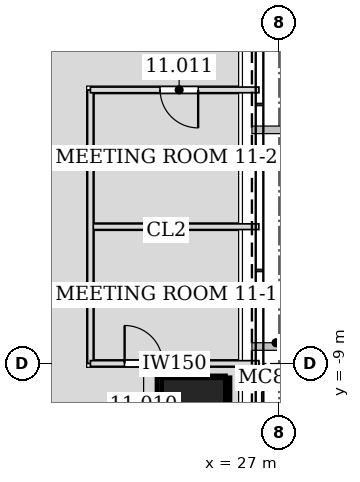
"""IFC4 building model, lengths in metres.
Left out: names, types, materials, properties, quantities, classifications, styles, units other than length and angle.
Written with IfcOpenShell. Run it as: python <this file> out.ifc"""

import sys

from ifc_helpers import new_model, si_unit, direction, frame, frame_2d, origin, origin_2d, place, context, subcontext, project, spatial, rectangle, hollow_rectangle, extrude, element, fill, save


model = new_model("IFC4")
c1 = context("Model", 3, precision=1e-05, world=origin(), true_north=direction((0.0, 1.0)))
c2 = subcontext(c1, "Body", "Model", "MODEL_VIEW")
j1 = project(units=[si_unit("LENGTHUNIT", "METRE"), si_unit("PLANEANGLEUNIT", "RADIAN")], contexts=[c1])
p1 = place(None, origin())
s1 = spatial("IfcSite", under=j1, at=p1, CompositionType="ELEMENT")
p2 = place(p1, origin())
s2 = spatial("IfcBuilding", under=s1, at=p2, CompositionType="ELEMENT")
p3 = place(p2, frame((0.0, 0.0, 54.0)))
s3 = spatial("IfcBuildingStorey", under=s2, at=p3, CompositionType="ELEMENT", Elevation=54.0)
p4 = place(p3, frame((24.809, -10.276, 0.0), z_axis=(-0.028237693676, 0.011678552323, 0.999533012997), x_axis=(-0.382183844423, -0.924086310396, 0.0)))
e1 = element("IfcColumn", 1, at=p4, inside=s3, PredefinedType="COLUMN", context=c2, shape_type="SweptSolid", body=[
    extrude(hollow_rectangle(XDim=1.8, YDim=1.8, WallThickness=0.085, at=origin_2d()), origin(), (0.0, 0.0, 1.0), 4.202),
])
p5 = place(p3, frame((26.469, -5.4, 0.0), z_axis=(0.0, 0.0, 1.0), x_axis=(-1.0, 0.0, 0.0)))
e2 = element("IfcWall", 2, at=p5, inside=s3, PredefinedType="PARTITIONING", context=c2, shape_type="SweptSolid", body=[
    extrude(rectangle(XDim=4.432, YDim=0.15, at=frame_2d((2.216, 0.0))), origin(), (0.0, 0.0, 1.0), 3.418),
])
p6 = place(p3, frame((22.037, -9.0, 0.0), z_axis=(0.0, 0.0, 1.0), x_axis=(0.0, 1.0, 0.0)))
e3 = element("IfcWall", 3, at=p6, inside=s3, PredefinedType="PARTITIONING", context=c2, shape_type="SweptSolid", body=[
    extrude(rectangle(XDim=7.2, YDim=0.15, at=frame_2d((3.6, 0.0))), origin(), (0.0, 0.0, 1.0), 4.035),
])
p7 = place(p3, frame((22.037, -9.0, 0.0), z_axis=(0.0, 0.0, 1.0), x_axis=(1.0, 0.0, 0.0)))
e4 = element("IfcWall", 4, at=p7, inside=s3, PredefinedType="PARTITIONING", context=c2, shape_type="SweptSolid", body=[
    extrude(rectangle(XDim=4.434, YDim=0.15, at=frame_2d((2.217, 0.0))), origin(), (0.0, 0.0, 1.0), 3.418),
])
p8 = place(p7, frame((0.9, 0.0, 0.0)))
e5 = element("IfcOpeningElement", 5, at=p8, cuts=e4, PredefinedType="OPENING", context=c2, shape_type="SweptSolid", body=[
    extrude(rectangle(XDim=1.0, YDim=2.1, at=frame_2d((0.5, 1.05))), frame((0.0, 0.085, 0.0), z_axis=(0.0, -1.0, 0.0), x_axis=(1.0, 0.0, 0.0)), (0.0, 0.0, 1.0), 0.17),
])
p9 = place(p3, frame((26.471, -1.8, 0.0), z_axis=(0.0, 0.0, 1.0), x_axis=(-1.0, 0.0, 0.0)))
e6 = element("IfcWall", 6, at=p9, inside=s3, PredefinedType="PARTITIONING", context=c2, shape_type="SweptSolid", body=[
    extrude(rectangle(XDim=4.434, YDim=0.15, at=frame_2d((2.217, 0.0))), origin(), (0.0, 0.0, 1.0), 3.418),
])
p10 = place(p9, frame((1.599, 0.0, 0.0)))
e7 = element("IfcOpeningElement", 7, at=p10, cuts=e6, PredefinedType="OPENING", context=c2, shape_type="SweptSolid", body=[
    extrude(rectangle(XDim=1.0, YDim=2.1, at=frame_2d((0.5, 1.05))), frame((0.0, 0.085, 0.0), z_axis=(0.0, -1.0, 0.0), x_axis=(1.0, 0.0, 0.0)), (0.0, 0.0, 1.0), 0.17),
])
p11 = place(p8, origin())
e8 = element("IfcDoor", 8, at=p11, inside=s3, OperationType="SINGLE_SWING_LEFT", PredefinedType="DOOR", context=c2, shape_type="SweptSolid", body=[
    extrude(rectangle(XDim=1.0, YDim=2.1, at=frame_2d((0.5, 1.05))), frame((0.0, 0.025, 0.0), z_axis=(0.0, -1.0, 0.0), x_axis=(1.0, 0.0, 0.0)), (0.0, 0.0, 1.0), 0.05),
])
fill(e5, e8)
p12 = place(p10, origin())
e9 = element("IfcDoor", 9, at=p12, inside=s3, OperationType="SINGLE_SWING_LEFT", PredefinedType="DOOR", context=c2, shape_type="SweptSolid", body=[
    extrude(rectangle(XDim=1.0, YDim=2.1, at=frame_2d((0.5, 1.05))), frame((0.0, 0.025, 0.0), z_axis=(0.0, -1.0, 0.0), x_axis=(1.0, 0.0, 0.0)), (0.0, 0.0, 1.0), 0.05),
])
fill(e7, e9)
save(model, sys.argv[1])
